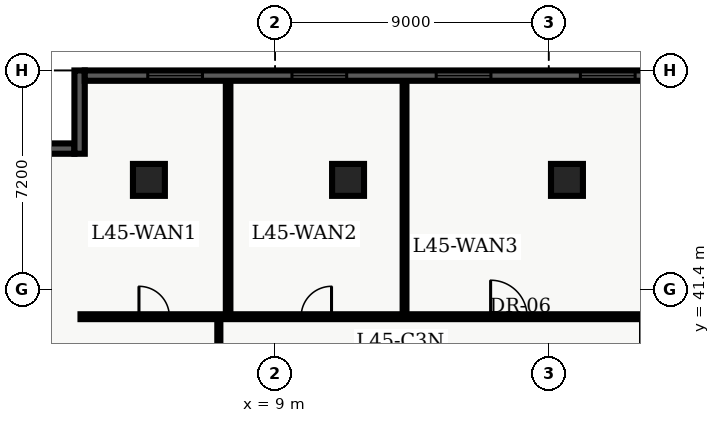
"""IFC4 building model, lengths in metres.
Left out: names, types, materials, properties, quantities, classifications, styles, units other than length and angle.
Written with IfcOpenShell. Run it as: python <this file> out.ifc"""

import sys

from ifc_helpers import new_model, entity, si_unit, converted_unit, direction, frame, origin_with_axes, origin_2d_with_axis, place, context, subcontext, project, spatial, polyline, rectangle, outline, extrude, element, fill, save


model = new_model("IFC4")
c1 = context("Model", 3, precision=1e-05, world=origin_with_axes(), true_north=direction((0.0, 1.0)))
c2 = subcontext(c1, "Body", "Model", "MODEL_VIEW")
j1 = project(units=[si_unit("LENGTHUNIT", "METRE"), converted_unit("PLANEANGLEUNIT", "DEGREE", entity("IfcPlaneAngleMeasure", 0.017), si_unit("PLANEANGLEUNIT", "RADIAN"), dimensions=[0, 0, 0, 0, 0, 0, 0])], contexts=[c1])
p1 = place(None, origin_with_axes())
s1 = spatial("IfcSite", under=j1, at=p1, CompositionType="ELEMENT")
p2 = place(p1, origin_with_axes())
s2 = spatial("IfcBuilding", under=s1, at=p2, CompositionType="ELEMENT")
p3 = place(p2, frame((0.0, 0.0, 183.6), z_axis=(0.0, 0.0, 1.0), x_axis=(1.0, 0.0, 0.0)))
s3 = spatial("IfcBuildingStorey", under=s2, at=p3, CompositionType="ELEMENT", Elevation=183.6)
for number, where, z_axis, x_axis in (
    (1, (11.4, 45.0, 0.0), (0.0, 0.0, 1.0), (1.0, 0.0, 0.0)),
    (2, (18.6, 45.0, 0.0), (0.0, 0.0, 1.0), (1.0, 0.0, 0.0)),
    (3, (4.85, 45.0, 0.0), (0.0, 0.0, 1.0), (1.0, 0.0, 0.0)),
):
    element("IfcColumn", number, at=place(p3, frame(where, z_axis=z_axis, x_axis=x_axis)), inside=s3, PredefinedType="COLUMN", context=c2, shape_type="SweptSolid", body=[
        extrude(rectangle(XDim=1.05, YDim=1.05, at=origin_2d_with_axis()), origin_with_axes(), (0.0, 0.0, 1.0), 3.9),
    ])
p4 = place(p3, frame((2.6, 40.5, 0.0), z_axis=(0.0, 0.0, 1.0), x_axis=(1.0, 0.0, 0.0)))
e4 = element("IfcWall", 4, at=p4, inside=s3, PredefinedType="PARTITIONING", context=c2, shape_type="SweptSolid", body=[
    extrude(outline(polyline([(0.0, -0.08), (23.459, -0.08), (23.459, 0.08), (0.0, 0.08), (0.0, -0.08)])), origin_with_axes(), (0.0, 0.0, 1.0), 2.64),
])
p5 = place(p4, frame((2.422, 0.0, 0.0), z_axis=(0.0, 0.0, 1.0), x_axis=(1.0, 0.0, 0.0)))
e5 = element("IfcOpeningElement", 5, at=p5, cuts=e4, PredefinedType="OPENING", context=c2, shape_type="SweptSolid", body=[
    extrude(rectangle(XDim=1.0, YDim=0.18, at=origin_2d_with_axis()), origin_with_axes(), (0.0, 0.0, 1.0), 2.15),
])
p6 = place(p4, frame((7.756, 0.0, 0.0), z_axis=(0.0, 0.0, 1.0), x_axis=(1.0, 0.0, 0.0)))
e6 = element("IfcOpeningElement", 6, at=p6, cuts=e4, PredefinedType="OPENING", context=c2, shape_type="SweptSolid", body=[
    extrude(rectangle(XDim=1.0, YDim=0.18, at=origin_2d_with_axis()), origin_with_axes(), (0.0, 0.0, 1.0), 2.15),
])
p7 = place(p4, frame((14.089, 0.0, 0.0), z_axis=(0.0, 0.0, 1.0), x_axis=(1.0, 0.0, 0.0)))
e7 = element("IfcOpeningElement", 7, at=p7, cuts=e4, PredefinedType="OPENING", context=c2, shape_type="SweptSolid", body=[
    extrude(rectangle(XDim=1.2, YDim=0.18, at=origin_2d_with_axis()), origin_with_axes(), (0.0, 0.0, 1.0), 2.2),
])
p8 = place(p3, frame((7.15, 7.8, 0.0), z_axis=(0.0, 0.0, 1.0), x_axis=(0.0, 1.0, 0.0)))
e8 = element("IfcWall", 8, at=p8, inside=s3, PredefinedType="PARTITIONING", context=c2, shape_type="SweptSolid", body=[
    extrude(outline(polyline([(0.0, -0.05), (32.7, -0.05), (32.7, 0.05), (0.0, 0.05), (0.0, -0.05)])), origin_with_axes(), (0.0, 0.0, 1.0), 2.64),
])
p9 = place(p8, frame((7.092, 0.0, 0.0), z_axis=(0.0, 0.0, 1.0), x_axis=(1.0, 0.0, 0.0)))
e9 = element("IfcOpeningElement", 9, at=p9, cuts=e8, PredefinedType="OPENING", context=c2, shape_type="SweptSolid", body=[
    extrude(rectangle(XDim=1.0, YDim=0.12, at=origin_2d_with_axis()), origin_with_axes(), (0.0, 0.0, 1.0), 2.15),
])
p10 = place(p8, frame((23.312, 0.0, 0.0), z_axis=(0.0, 0.0, 1.0), x_axis=(1.0, 0.0, 0.0)))
e10 = element("IfcOpeningElement", 10, at=p10, cuts=e8, PredefinedType="OPENING", context=c2, shape_type="SweptSolid", body=[
    extrude(rectangle(XDim=1.0, YDim=0.12, at=origin_2d_with_axis()), origin_with_axes(), (0.0, 0.0, 1.0), 2.15),
])
p11 = place(p3, frame((7.455, 40.6, 0.0), z_axis=(0.0, 0.0, 1.0), x_axis=(0.0, 1.0, 0.0)))
e11 = element("IfcWall", 11, at=p11, inside=s3, PredefinedType="PARTITIONING", context=c2, shape_type="SweptSolid", body=[
    extrude(outline(polyline([(0.0, -0.075), (7.665, -0.075), (7.665, 0.075), (0.0, 0.075), (0.0, -0.075)])), origin_with_axes(), (0.0, 0.0, 1.0), 2.64),
])
p12 = place(p3, frame((13.258, 40.6, 0.0), z_axis=(0.0, 0.0, 1.0), x_axis=(0.0, 1.0, 0.0)))
e12 = element("IfcWall", 12, at=p12, inside=s3, PredefinedType="PARTITIONING", context=c2, shape_type="SweptSolid", body=[
    extrude(outline(polyline([(0.0, -0.062), (7.665, -0.062), (7.665, 0.062), (0.0, 0.062), (0.0, -0.062)])), origin_with_axes(), (0.0, 0.0, 1.0), 2.64),
])
p13 = place(p3, frame((0.34, 46.03, 0.0), z_axis=(0.0, 0.0, 1.0), x_axis=(1.0, 0.0, 0.0)))
e13 = element("IfcWall", 13, at=p13, inside=s3, PredefinedType="SOLIDWALL", context=c2, shape_type="SweptSolid", body=[
    extrude(outline(polyline([(0.0, -0.17), (2.06, -0.17), (2.06, 0.17), (0.0, 0.17), (0.0, -0.17)])), origin_with_axes(), (0.0, 0.0, 1.0), 3.6),
])
p14 = place(p3, frame((2.57, 45.86, 0.0), z_axis=(0.0, 0.0, 1.0), x_axis=(0.0, 1.0, 0.0)))
e14 = element("IfcWall", 14, at=p14, inside=s3, PredefinedType="SOLIDWALL", context=c2, shape_type="SweptSolid", body=[
    extrude(outline(polyline([(0.0, -0.17), (2.74, -0.17), (2.74, 0.17), (0.0, 0.17), (0.0, -0.17)])), origin_with_axes(), (0.0, 0.0, 1.0), 3.6),
])
p15 = place(p3, frame((2.74, 48.43, 0.0), z_axis=(0.0, 0.0, 1.0), x_axis=(1.0, 0.0, 0.0)))
e15 = element("IfcWall", 15, at=p15, inside=s3, PredefinedType="SOLIDWALL", context=c2, shape_type="SweptSolid", body=[
    extrude(outline(polyline([(0.0, -0.17), (20.174, -0.17), (20.174, 0.17), (0.0, 0.17), (0.0, -0.17)])), origin_with_axes(), (0.0, 0.0, 1.0), 3.6),
])
p16 = place(p15, frame((2.972, 0.0, 0.45), z_axis=(0.0, 0.0, 1.0), x_axis=(1.0, 0.0, 0.0)))
e16 = element("IfcOpeningElement", 16, at=p16, cuts=e15, PredefinedType="OPENING", context=c2, shape_type="SweptSolid", body=[
    extrude(rectangle(XDim=1.8, YDim=0.36, at=origin_2d_with_axis()), origin_with_axes(), (0.0, 0.0, 1.0), 2.1),
])
p17 = place(p15, frame((7.715, 0.0, 0.45), z_axis=(0.0, 0.0, 1.0), x_axis=(1.0, 0.0, 0.0)))
e17 = element("IfcOpeningElement", 17, at=p17, cuts=e15, PredefinedType="OPENING", context=c2, shape_type="SweptSolid", body=[
    extrude(rectangle(XDim=1.8, YDim=0.36, at=origin_2d_with_axis()), origin_with_axes(), (0.0, 0.0, 1.0), 2.1),
])
p18 = place(p15, frame((12.459, 0.0, 0.45), z_axis=(0.0, 0.0, 1.0), x_axis=(1.0, 0.0, 0.0)))
e18 = element("IfcOpeningElement", 18, at=p18, cuts=e15, PredefinedType="OPENING", context=c2, shape_type="SweptSolid", body=[
    extrude(rectangle(XDim=1.8, YDim=0.36, at=origin_2d_with_axis()), origin_with_axes(), (0.0, 0.0, 1.0), 2.1),
])
p19 = place(p15, frame((17.202, 0.0, 0.45), z_axis=(0.0, 0.0, 1.0), x_axis=(1.0, 0.0, 0.0)))
e19 = element("IfcOpeningElement", 19, at=p19, cuts=e15, PredefinedType="OPENING", context=c2, shape_type="SweptSolid", body=[
    extrude(rectangle(XDim=1.8, YDim=0.36, at=origin_2d_with_axis()), origin_with_axes(), (0.0, 0.0, 1.0), 2.1),
])
p20 = place(p4, frame((2.422, 0.0, 0.0), z_axis=(0.0, 0.0, 1.0), x_axis=(1.0, 0.0, 0.0)))
e20 = element("IfcDoor", 20, at=p20, inside=s3, OperationType="SINGLE_SWING_LEFT", PredefinedType="DOOR", context=c2, shape_type="SweptSolid", body=[
    extrude(rectangle(XDim=1.0, YDim=0.09, at=origin_2d_with_axis()), origin_with_axes(), (0.0, 0.0, 1.0), 2.15),
])
fill(e5, e20)
p21 = place(p4, frame((7.756, 0.0, 0.0), z_axis=(0.0, 0.0, 1.0), x_axis=(1.0, 0.0, 0.0)))
e21 = element("IfcDoor", 21, at=p21, inside=s3, OperationType="SINGLE_SWING_RIGHT", PredefinedType="DOOR", context=c2, shape_type="SweptSolid", body=[
    extrude(rectangle(XDim=1.0, YDim=0.09, at=origin_2d_with_axis()), origin_with_axes(), (0.0, 0.0, 1.0), 2.15),
])
fill(e6, e21)
p22 = place(p4, frame((14.089, 0.0, 0.0), z_axis=(0.0, 0.0, 1.0), x_axis=(1.0, 0.0, 0.0)))
e22 = element("IfcDoor", 22, at=p22, inside=s3, OperationType="SINGLE_SWING_LEFT", PredefinedType="DOOR", context=c2, shape_type="SweptSolid", body=[
    extrude(rectangle(XDim=1.2, YDim=0.09, at=origin_2d_with_axis()), origin_with_axes(), (0.0, 0.0, 1.0), 2.2),
])
fill(e7, e22)
p23 = place(p15, frame((2.972, 0.0, 0.45), z_axis=(0.0, 0.0, 1.0), x_axis=(1.0, 0.0, 0.0)))
e23 = element("IfcWindow", 23, at=p23, inside=s3, PredefinedType="WINDOW", context=c2, shape_type="SweptSolid", body=[
    extrude(rectangle(XDim=1.8, YDim=0.09, at=origin_2d_with_axis()), origin_with_axes(), (0.0, 0.0, 1.0), 2.1),
])
fill(e16, e23)
p24 = place(p15, frame((7.715, 0.0, 0.45), z_axis=(0.0, 0.0, 1.0), x_axis=(1.0, 0.0, 0.0)))
e24 = element("IfcWindow", 24, at=p24, inside=s3, PredefinedType="WINDOW", context=c2, shape_type="SweptSolid", body=[
    extrude(rectangle(XDim=1.8, YDim=0.09, at=origin_2d_with_axis()), origin_with_axes(), (0.0, 0.0, 1.0), 2.1),
])
fill(e17, e24)
p25 = place(p15, frame((12.459, 0.0, 0.45), z_axis=(0.0, 0.0, 1.0), x_axis=(1.0, 0.0, 0.0)))
e25 = element("IfcWindow", 25, at=p25, inside=s3, PredefinedType="WINDOW", context=c2, shape_type="SweptSolid", body=[
    extrude(rectangle(XDim=1.8, YDim=0.09, at=origin_2d_with_axis()), origin_with_axes(), (0.0, 0.0, 1.0), 2.1),
])
fill(e18, e25)
p26 = place(p15, frame((17.202, 0.0, 0.45), z_axis=(0.0, 0.0, 1.0), x_axis=(1.0, 0.0, 0.0)))
e26 = element("IfcWindow", 26, at=p26, inside=s3, PredefinedType="WINDOW", context=c2, shape_type="SweptSolid", body=[
    extrude(rectangle(XDim=1.8, YDim=0.09, at=origin_2d_with_axis()), origin_with_axes(), (0.0, 0.0, 1.0), 2.1),
])
fill(e19, e26)
save(model, sys.argv[1])
